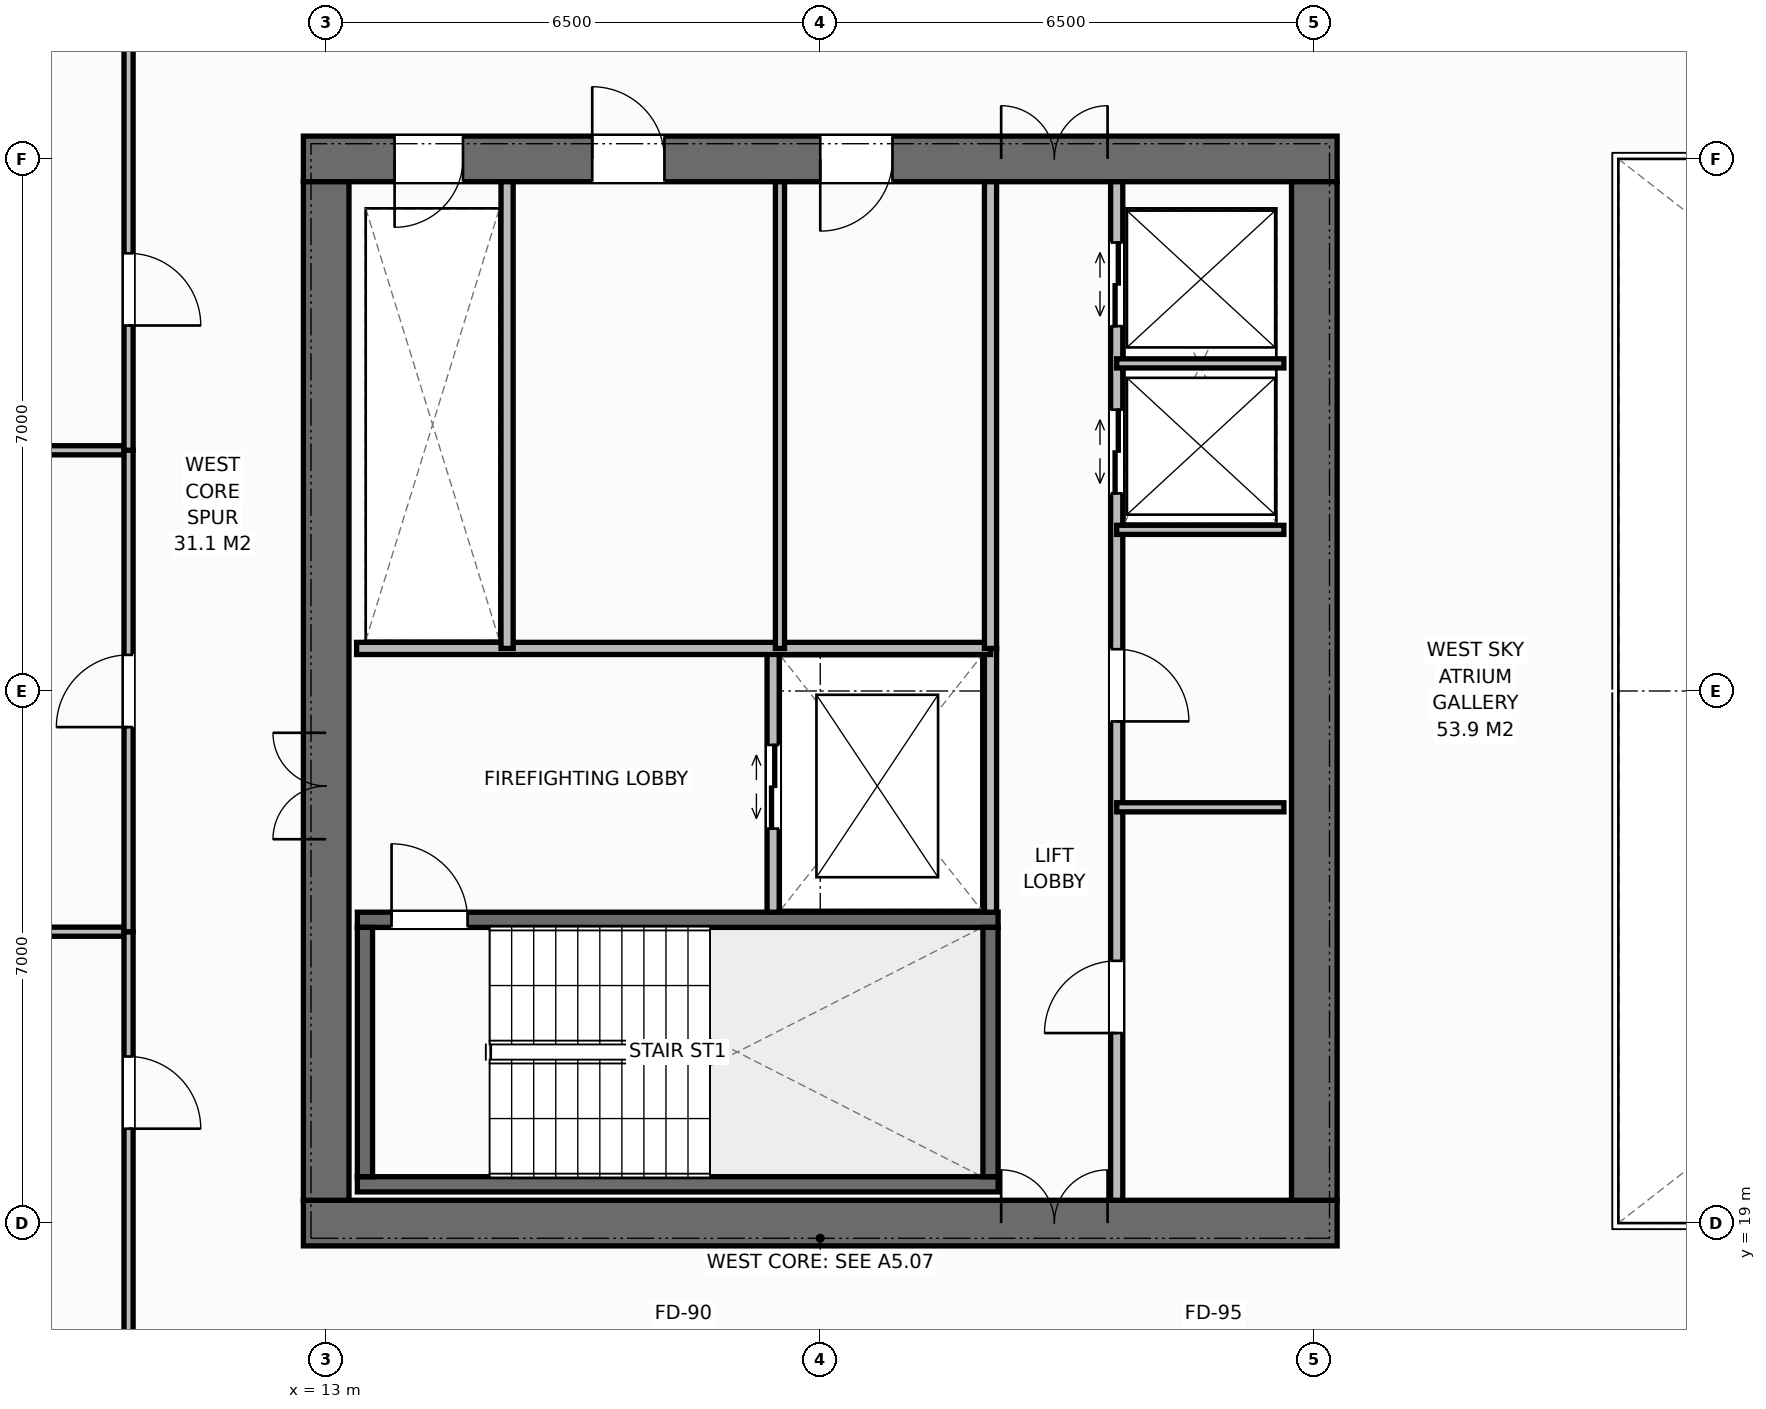
"""IFC4 building model, lengths in metres.
Left out: names, types, materials, properties, quantities, classifications, styles, units other than length and angle.
Written with IfcOpenShell. Run it as: python <this file> out.ifc"""

import sys

from ifc_helpers import new_model, si_unit, direction, frame, frame_2d, origin, place, context, subcontext, project, spatial, rectangle, extrude, element, fill, save


model = new_model("IFC4")
c1 = context("Model", 3, precision=1e-05, world=origin(), true_north=direction((0.0, 1.0)))
c2 = subcontext(c1, "Body", "Model", "MODEL_VIEW")
j1 = project(units=[si_unit("LENGTHUNIT", "METRE"), si_unit("PLANEANGLEUNIT", "RADIAN")], contexts=[c1])
p1 = place(None, origin())
s1 = spatial("IfcSite", under=j1, at=p1, CompositionType="ELEMENT")
p2 = place(p1, origin())
s2 = spatial("IfcBuilding", under=s1, at=p2, CompositionType="ELEMENT")
p3 = place(p2, frame((0.0, 0.0, 151.8)))
s3 = spatial("IfcBuildingStorey", under=s2, at=p3, CompositionType="ELEMENT", Elevation=151.8)
p4 = place(p3, frame((12.7, 19.0, 0.0), z_axis=(0.0, 0.0, 1.0), x_axis=(1.0, 0.0, 0.0)))
e1 = element("IfcWall", 1, at=p4, inside=s3, PredefinedType="SHEAR", context=c2, shape_type="SweptSolid", body=[
    extrude(rectangle(XDim=13.6, YDim=0.6, at=frame_2d((6.8, 0.0))), origin(), (0.0, 0.0, 1.0), 3.8),
])
p5 = place(p4, frame((9.18, 0.0, 0.0)))
e2 = element("IfcOpeningElement", 2, at=p5, cuts=e1, PredefinedType="OPENING", context=c2, shape_type="SweptSolid", body=[
    extrude(rectangle(XDim=1.4, YDim=2.2, at=frame_2d((0.7, 1.1))), frame((0.0, 0.31, 0.0), z_axis=(0.0, -1.0, 0.0), x_axis=(1.0, 0.0, 0.0)), (0.0, 0.0, 1.0), 0.62),
])
p6 = place(p3, frame((12.7, 33.0, 0.0), z_axis=(0.0, 0.0, 1.0), x_axis=(1.0, 0.0, 0.0)))
e3 = element("IfcWall", 3, at=p6, inside=s3, PredefinedType="SHEAR", context=c2, shape_type="SweptSolid", body=[
    extrude(rectangle(XDim=13.6, YDim=0.6, at=frame_2d((6.8, 0.0))), origin(), (0.0, 0.0, 1.0), 3.8),
])
p7 = place(p6, frame((1.2, 0.0, 0.0)))
e4 = element("IfcOpeningElement", 4, at=p7, cuts=e3, PredefinedType="OPENING", context=c2, shape_type="SweptSolid", body=[
    extrude(rectangle(XDim=0.9, YDim=2.15, at=frame_2d((0.45, 1.075))), frame((0.0, 0.31, 0.0), z_axis=(0.0, -1.0, 0.0), x_axis=(1.0, 0.0, 0.0)), (0.0, 0.0, 1.0), 0.62),
])
p8 = place(p6, frame((3.8, 0.0, 0.0)))
e5 = element("IfcOpeningElement", 5, at=p8, cuts=e3, PredefinedType="OPENING", context=c2, shape_type="SweptSolid", body=[
    extrude(rectangle(XDim=0.95, YDim=2.15, at=frame_2d((0.475, 1.075))), frame((0.0, 0.31, 0.0), z_axis=(0.0, -1.0, 0.0), x_axis=(1.0, 0.0, 0.0)), (0.0, 0.0, 1.0), 0.62),
])
p9 = place(p6, frame((6.8, 0.0, 0.0)))
e6 = element("IfcOpeningElement", 6, at=p9, cuts=e3, PredefinedType="OPENING", context=c2, shape_type="SweptSolid", body=[
    extrude(rectangle(XDim=0.95, YDim=2.15, at=frame_2d((0.475, 1.075))), frame((0.0, 0.31, 0.0), z_axis=(0.0, -1.0, 0.0), x_axis=(1.0, 0.0, 0.0)), (0.0, 0.0, 1.0), 0.62),
])
p10 = place(p6, frame((9.18, 0.0, 0.0)))
e7 = element("IfcOpeningElement", 7, at=p10, cuts=e3, PredefinedType="OPENING", context=c2, shape_type="SweptSolid", body=[
    extrude(rectangle(XDim=1.4, YDim=2.2, at=frame_2d((0.7, 1.1))), frame((0.0, 0.31, 0.0), z_axis=(0.0, -1.0, 0.0), x_axis=(1.0, 0.0, 0.0)), (0.0, 0.0, 1.0), 0.62),
])
p11 = place(p3, frame((13.0, 19.3, 0.0), z_axis=(0.0, 0.0, 1.0), x_axis=(0.0, 1.0, 0.0)))
e8 = element("IfcWall", 8, at=p11, inside=s3, PredefinedType="SHEAR", context=c2, shape_type="SweptSolid", body=[
    extrude(rectangle(XDim=13.4, YDim=0.6, at=frame_2d((6.7, 0.0))), origin(), (0.0, 0.0, 1.0), 3.8),
])
p12 = place(p11, frame((4.75, 0.0, 0.0)))
e9 = element("IfcOpeningElement", 9, at=p12, cuts=e8, PredefinedType="OPENING", context=c2, shape_type="SweptSolid", body=[
    extrude(rectangle(XDim=1.4, YDim=2.2, at=frame_2d((0.7, 1.1))), frame((0.0, 0.31, 0.0), z_axis=(0.0, -1.0, 0.0), x_axis=(1.0, 0.0, 0.0)), (0.0, 0.0, 1.0), 0.62),
])
p13 = place(p3, frame((26.0, 19.3, 0.0), z_axis=(0.0, 0.0, 1.0), x_axis=(0.0, 1.0, 0.0)))
e10 = element("IfcWall", 10, at=p13, inside=s3, PredefinedType="SHEAR", context=c2, shape_type="SweptSolid", body=[
    extrude(rectangle(XDim=13.4, YDim=0.6, at=frame_2d((6.7, 0.0))), origin(), (0.0, 0.0, 1.0), 3.8),
])
p14 = place(p3, frame((13.41, 19.51, 0.0), z_axis=(0.0, 0.0, 1.0), x_axis=(1.0, 0.0, 0.0)))
e11 = element("IfcWall", 11, at=p14, inside=s3, PredefinedType="SHEAR", context=c2, shape_type="SweptSolid", body=[
    extrude(rectangle(XDim=8.43, YDim=0.2, at=frame_2d((4.215, 0.0))), origin(), (0.0, 0.0, 1.0), 3.8),
])
p15 = place(p3, frame((13.41, 22.99, 0.0), z_axis=(0.0, 0.0, 1.0), x_axis=(1.0, 0.0, 0.0)))
e12 = element("IfcWall", 12, at=p15, inside=s3, PredefinedType="SHEAR", context=c2, shape_type="SweptSolid", body=[
    extrude(rectangle(XDim=8.43, YDim=0.2, at=frame_2d((4.215, 0.0))), origin(), (0.0, 0.0, 1.0), 3.8),
])
p16 = place(p15, frame((0.45, 0.0, 0.0)))
e13 = element("IfcOpeningElement", 13, at=p16, cuts=e12, PredefinedType="OPENING", context=c2, shape_type="SweptSolid", body=[
    extrude(rectangle(XDim=1.0, YDim=2.15, at=frame_2d((0.5, 1.075))), frame((0.0, 0.11, 0.0), z_axis=(0.0, -1.0, 0.0), x_axis=(1.0, 0.0, 0.0)), (0.0, 0.0, 1.0), 0.22),
])
for number, where, z_axis, x_axis in (
    (14, (13.51, 19.61, 0.0), (0.0, 0.0, 1.0), (0.0, 1.0, 0.0)),
    (15, (21.74, 19.61, 0.0), (0.0, 0.0, 1.0), (0.0, 1.0, 0.0)),
):
    element("IfcWall", number, at=place(p3, frame(where, z_axis=z_axis, x_axis=x_axis)), inside=s3, PredefinedType="SHEAR", context=c2, shape_type="SweptSolid", body=[
        extrude(rectangle(XDim=3.28, YDim=0.2, at=frame_2d((1.64, 0.0))), origin(), (0.0, 0.0, 1.0), 3.8),
    ])
p17 = place(p3, frame((21.74, 23.09, 0.0), z_axis=(0.0, 0.0, 1.0), x_axis=(0.0, 1.0, 0.0)))
e16 = element("IfcWall", 16, at=p17, inside=s3, PredefinedType="STANDARD", context=c2, shape_type="SweptSolid", body=[
    extrude(rectangle(XDim=3.47, YDim=0.16, at=frame_2d((1.735, 0.0))), origin(), (0.0, 0.0, 1.0), 3.572),
])
p18 = place(p3, frame((18.88, 23.09, 0.0), z_axis=(0.0, 0.0, 1.0), x_axis=(0.0, 1.0, 0.0)))
e17 = element("IfcWall", 17, at=p18, inside=s3, PredefinedType="STANDARD", context=c2, shape_type="SweptSolid", body=[
    extrude(rectangle(XDim=3.47, YDim=0.16, at=frame_2d((1.735, 0.0))), origin(), (0.0, 0.0, 1.0), 3.572),
])
p19 = place(p18, frame((1.1, 0.0, 0.0)))
e18 = element("IfcOpeningElement", 18, at=p19, cuts=e17, PredefinedType="OPENING", context=c2, shape_type="SweptSolid", body=[
    extrude(rectangle(XDim=1.1, YDim=2.2, at=frame_2d((0.55, 1.1))), frame((0.0, 0.09, 0.0), z_axis=(0.0, -1.0, 0.0), x_axis=(1.0, 0.0, 0.0)), (0.0, 0.0, 1.0), 0.18),
])
p20 = place(p3, frame((13.4, 26.56, 0.0), z_axis=(0.0, 0.0, 1.0), x_axis=(1.0, 0.0, 0.0)))
e19 = element("IfcWall", 19, at=p20, inside=s3, PredefinedType="STANDARD", context=c2, shape_type="SweptSolid", body=[
    extrude(rectangle(XDim=8.34, YDim=0.16, at=frame_2d((4.17, 0.0))), origin(), (0.0, 0.0, 1.0), 3.572),
])
p21 = place(p3, frame((15.38, 26.56, 0.0), z_axis=(0.0, 0.0, 1.0), x_axis=(0.0, 1.0, 0.0)))
e20 = element("IfcWall", 20, at=p21, inside=s3, PredefinedType="STANDARD", context=c2, shape_type="SweptSolid", body=[
    extrude(rectangle(XDim=6.14, YDim=0.16, at=frame_2d((3.07, 0.0))), origin(), (0.0, 0.0, 1.0), 3.572),
])
p22 = place(p3, frame((18.97, 26.56, 0.0), z_axis=(0.0, 0.0, 1.0), x_axis=(0.0, 1.0, 0.0)))
e21 = element("IfcWall", 21, at=p22, inside=s3, PredefinedType="PARTITIONING", context=c2, shape_type="SweptSolid", body=[
    extrude(rectangle(XDim=6.14, YDim=0.12, at=frame_2d((3.07, 0.0))), origin(), (0.0, 0.0, 1.0), 3.572),
])
p23 = place(p3, frame((21.74, 26.56, 0.0), z_axis=(0.0, 0.0, 1.0), x_axis=(0.0, 1.0, 0.0)))
e22 = element("IfcWall", 22, at=p23, inside=s3, PredefinedType="STANDARD", context=c2, shape_type="SweptSolid", body=[
    extrude(rectangle(XDim=6.14, YDim=0.16, at=frame_2d((3.07, 0.0))), origin(), (0.0, 0.0, 1.0), 3.572),
])
p24 = place(p3, frame((23.4, 19.3, 0.0), z_axis=(0.0, 0.0, 1.0), x_axis=(0.0, 1.0, 0.0)))
e23 = element("IfcWall", 23, at=p24, inside=s3, PredefinedType="STANDARD", context=c2, shape_type="SweptSolid", body=[
    extrude(rectangle(XDim=13.4, YDim=0.16, at=frame_2d((6.7, 0.0))), origin(), (0.0, 0.0, 1.0), 3.572),
])
p25 = place(p24, frame((2.2, 0.0, 0.0)))
e24 = element("IfcOpeningElement", 24, at=p25, cuts=e23, PredefinedType="OPENING", context=c2, shape_type="SweptSolid", body=[
    extrude(rectangle(XDim=0.95, YDim=2.15, at=frame_2d((0.475, 1.075))), frame((0.0, 0.09, 0.0), z_axis=(0.0, -1.0, 0.0), x_axis=(1.0, 0.0, 0.0)), (0.0, 0.0, 1.0), 0.18),
])
p26 = place(p24, frame((6.3, 0.0, 0.0)))
e25 = element("IfcOpeningElement", 25, at=p26, cuts=e23, PredefinedType="OPENING", context=c2, shape_type="SweptSolid", body=[
    extrude(rectangle(XDim=0.95, YDim=2.15, at=frame_2d((0.475, 1.075))), frame((0.0, 0.09, 0.0), z_axis=(0.0, -1.0, 0.0), x_axis=(1.0, 0.0, 0.0)), (0.0, 0.0, 1.0), 0.18),
])
p27 = place(p24, frame((9.3, 0.0, 0.0)))
e26 = element("IfcOpeningElement", 26, at=p27, cuts=e23, PredefinedType="OPENING", context=c2, shape_type="SweptSolid", body=[
    extrude(rectangle(XDim=1.1, YDim=2.2, at=frame_2d((0.55, 1.1))), frame((0.0, 0.09, 0.0), z_axis=(0.0, -1.0, 0.0), x_axis=(1.0, 0.0, 0.0)), (0.0, 0.0, 1.0), 0.18),
])
p28 = place(p24, frame((11.5, 0.0, 0.0)))
e27 = element("IfcOpeningElement", 27, at=p28, cuts=e23, PredefinedType="OPENING", context=c2, shape_type="SweptSolid", body=[
    extrude(rectangle(XDim=1.1, YDim=2.2, at=frame_2d((0.55, 1.1))), frame((0.0, 0.09, 0.0), z_axis=(0.0, -1.0, 0.0), x_axis=(1.0, 0.0, 0.0)), (0.0, 0.0, 1.0), 0.18),
])
for number, where, z_axis, x_axis in (
    (28, (23.4, 24.47, 0.0), (0.0, 0.0, 1.0), (1.0, 0.0, 0.0)),
    (29, (23.4, 28.12, 0.0), (0.0, 0.0, 1.0), (1.0, 0.0, 0.0)),
    (30, (23.4, 30.31, 0.0), (0.0, 0.0, 1.0), (1.0, 0.0, 0.0)),
):
    element("IfcWall", number, at=place(p3, frame(where, z_axis=z_axis, x_axis=x_axis)), inside=s3, PredefinedType="PARTITIONING", context=c2, shape_type="SweptSolid", body=[
        extrude(rectangle(XDim=2.2, YDim=0.12, at=frame_2d((1.1, 0.0))), origin(), (0.0, 0.0, 1.0), 3.572),
    ])
p29 = place(p3, frame((3.82, 22.833, 0.0), z_axis=(0.0, 0.0, 1.0), x_axis=(1.0, 0.0, 0.0)))
e31 = element("IfcWall", 31, at=p29, inside=s3, PredefinedType="PARTITIONING", context=c2, shape_type="SweptSolid", body=[
    extrude(rectangle(XDim=6.58, YDim=0.12, at=frame_2d((3.29, 0.0))), origin(), (0.0, 0.0, 1.0), 3.572),
])
p30 = place(p3, frame((10.4, 16.5, 0.0), z_axis=(0.0, 0.0, 1.0), x_axis=(0.0, 1.0, 0.0)))
e32 = element("IfcWall", 32, at=p30, inside=s3, PredefinedType="PARTITIONING", context=c2, shape_type="SweptSolid", body=[
    extrude(rectangle(XDim=6.333, YDim=0.12, at=frame_2d((3.167, 0.0))), origin(), (0.0, 0.0, 1.0), 3.572),
])
p31 = place(p30, frame((3.742, 0.0, 0.0)))
e33 = element("IfcOpeningElement", 33, at=p31, cuts=e32, PredefinedType="OPENING", context=c2, shape_type="SweptSolid", body=[
    extrude(rectangle(XDim=0.95, YDim=2.15, at=frame_2d((0.475, 1.075))), frame((0.0, 0.07, 0.0), z_axis=(0.0, -1.0, 0.0), x_axis=(1.0, 0.0, 0.0)), (0.0, 0.0, 1.0), 0.14),
])
p32 = place(p3, frame((3.82, 29.167, 0.0), z_axis=(0.0, 0.0, 1.0), x_axis=(1.0, 0.0, 0.0)))
e34 = element("IfcWall", 34, at=p32, inside=s3, PredefinedType="PARTITIONING", context=c2, shape_type="SweptSolid", body=[
    extrude(rectangle(XDim=6.58, YDim=0.12, at=frame_2d((3.29, 0.0))), origin(), (0.0, 0.0, 1.0), 3.572),
])
p33 = place(p3, frame((10.4, 22.833, 0.0), z_axis=(0.0, 0.0, 1.0), x_axis=(0.0, 1.0, 0.0)))
e35 = element("IfcWall", 35, at=p33, inside=s3, PredefinedType="PARTITIONING", context=c2, shape_type="SweptSolid", body=[
    extrude(rectangle(XDim=6.333, YDim=0.12, at=frame_2d((3.167, 0.0))), origin(), (0.0, 0.0, 1.0), 3.572),
])
p34 = place(p33, frame((2.692, 0.0, 0.0)))
e36 = element("IfcOpeningElement", 36, at=p34, cuts=e35, PredefinedType="OPENING", context=c2, shape_type="SweptSolid", body=[
    extrude(rectangle(XDim=0.95, YDim=2.15, at=frame_2d((0.475, 1.075))), frame((0.0, 0.07, 0.0), z_axis=(0.0, -1.0, 0.0), x_axis=(1.0, 0.0, 0.0)), (0.0, 0.0, 1.0), 0.14),
])
p35 = place(p3, frame((10.4, 29.167, 0.0), z_axis=(0.0, 0.0, 1.0), x_axis=(0.0, 1.0, 0.0)))
e37 = element("IfcWall", 37, at=p35, inside=s3, PredefinedType="PARTITIONING", context=c2, shape_type="SweptSolid", body=[
    extrude(rectangle(XDim=6.333, YDim=0.12, at=frame_2d((3.167, 0.0))), origin(), (0.0, 0.0, 1.0), 3.572),
])
p36 = place(p35, frame((1.642, 0.0, 0.0)))
e38 = element("IfcOpeningElement", 38, at=p36, cuts=e37, PredefinedType="OPENING", context=c2, shape_type="SweptSolid", body=[
    extrude(rectangle(XDim=0.95, YDim=2.15, at=frame_2d((0.475, 1.075))), frame((0.0, 0.07, 0.0), z_axis=(0.0, -1.0, 0.0), x_axis=(1.0, 0.0, 0.0)), (0.0, 0.0, 1.0), 0.14),
])
p37 = place(p16, origin())
e39 = element("IfcDoor", 39, at=p37, inside=s3, OperationType="SINGLE_SWING_LEFT", PredefinedType="DOOR", context=c2, shape_type="SweptSolid", body=[
    extrude(rectangle(XDim=1.0, YDim=2.15, at=frame_2d((0.5, 1.075))), frame((0.0, 0.025, 0.0), z_axis=(0.0, -1.0, 0.0), x_axis=(1.0, 0.0, 0.0)), (0.0, 0.0, 1.0), 0.05),
])
fill(e13, e39)
p38 = place(p12, origin())
e40 = element("IfcDoor", 40, at=p38, inside=s3, OperationType="DOUBLE_DOOR_SINGLE_SWING", PredefinedType="DOOR", context=c2, shape_type="SweptSolid", body=[
    extrude(rectangle(XDim=1.4, YDim=2.2, at=frame_2d((0.7, 1.1))), frame((0.0, 0.025, 0.0), z_axis=(0.0, -1.0, 0.0), x_axis=(1.0, 0.0, 0.0)), (0.0, 0.0, 1.0), 0.05),
])
fill(e9, e40)
p39 = place(p19, origin())
e41 = element("IfcDoor", 41, at=p39, inside=s3, OperationType="DOUBLE_DOOR_SLIDING", PredefinedType="DOOR", context=c2, shape_type="SweptSolid", body=[
    extrude(rectangle(XDim=1.1, YDim=2.2, at=frame_2d((0.55, 1.1))), frame((0.0, 0.025, 0.0), z_axis=(0.0, -1.0, 0.0), x_axis=(1.0, 0.0, 0.0)), (0.0, 0.0, 1.0), 0.05),
])
fill(e18, e41)
p40 = place(p7, origin())
e42 = element("IfcDoor", 42, at=p40, inside=s3, OperationType="SINGLE_SWING_RIGHT", PredefinedType="DOOR", context=c2, shape_type="SweptSolid", body=[
    extrude(rectangle(XDim=0.9, YDim=2.15, at=frame_2d((0.45, 1.075))), frame((0.0, -0.025, 0.0), z_axis=(0.0, -1.0, 0.0), x_axis=(1.0, 0.0, 0.0)), (0.0, 0.0, 1.0), 0.05),
])
fill(e4, e42)
p41 = place(p8, origin())
e43 = element("IfcDoor", 43, at=p41, inside=s3, OperationType="SINGLE_SWING_LEFT", PredefinedType="DOOR", context=c2, shape_type="SweptSolid", body=[
    extrude(rectangle(XDim=0.95, YDim=2.15, at=frame_2d((0.475, 1.075))), frame((0.0, -0.025, 0.0), z_axis=(0.0, -1.0, 0.0), x_axis=(1.0, 0.0, 0.0)), (0.0, 0.0, 1.0), 0.05),
])
fill(e5, e43)
p42 = place(p9, origin())
e44 = element("IfcDoor", 44, at=p42, inside=s3, OperationType="SINGLE_SWING_RIGHT", PredefinedType="DOOR", context=c2, shape_type="SweptSolid", body=[
    extrude(rectangle(XDim=0.95, YDim=2.15, at=frame_2d((0.475, 1.075))), frame((0.0, -0.025, 0.0), z_axis=(0.0, -1.0, 0.0), x_axis=(1.0, 0.0, 0.0)), (0.0, 0.0, 1.0), 0.05),
])
fill(e6, e44)
p43 = place(p5, origin())
e45 = element("IfcDoor", 45, at=p43, inside=s3, OperationType="DOUBLE_DOOR_SINGLE_SWING", PredefinedType="DOOR", context=c2, shape_type="SweptSolid", body=[
    extrude(rectangle(XDim=1.4, YDim=2.2, at=frame_2d((0.7, 1.1))), frame((0.0, 0.075, 0.0), z_axis=(0.0, -1.0, 0.0), x_axis=(1.0, 0.0, 0.0)), (0.0, 0.0, 1.0), 0.05),
])
fill(e2, e45)
p44 = place(p10, origin())
e46 = element("IfcDoor", 46, at=p44, inside=s3, OperationType="DOUBLE_DOOR_SINGLE_SWING", PredefinedType="DOOR", context=c2, shape_type="SweptSolid", body=[
    extrude(rectangle(XDim=1.4, YDim=2.2, at=frame_2d((0.7, 1.1))), frame((0.0, -0.025, 0.0), z_axis=(0.0, -1.0, 0.0), x_axis=(1.0, 0.0, 0.0)), (0.0, 0.0, 1.0), 0.05),
])
fill(e7, e46)
p45 = place(p25, origin())
e47 = element("IfcDoor", 47, at=p45, inside=s3, OperationType="SINGLE_SWING_LEFT", PredefinedType="DOOR", context=c2, shape_type="SweptSolid", body=[
    extrude(rectangle(XDim=0.95, YDim=2.15, at=frame_2d((0.475, 1.075))), frame((0.0, 0.025, 0.0), z_axis=(0.0, -1.0, 0.0), x_axis=(1.0, 0.0, 0.0)), (0.0, 0.0, 1.0), 0.05),
])
fill(e24, e47)
p46 = place(p26, origin())
e48 = element("IfcDoor", 48, at=p46, inside=s3, OperationType="SINGLE_SWING_RIGHT", PredefinedType="DOOR", context=c2, shape_type="SweptSolid", body=[
    extrude(rectangle(XDim=0.95, YDim=2.15, at=frame_2d((0.475, 1.075))), frame((0.0, 0.025, 0.0), z_axis=(0.0, -1.0, 0.0), x_axis=(1.0, 0.0, 0.0)), (0.0, 0.0, 1.0), 0.05),
])
fill(e25, e48)
p47 = place(p27, origin())
e49 = element("IfcDoor", 49, at=p47, inside=s3, OperationType="DOUBLE_DOOR_SLIDING", PredefinedType="DOOR", context=c2, shape_type="SweptSolid", body=[
    extrude(rectangle(XDim=1.1, YDim=2.2, at=frame_2d((0.55, 1.1))), frame((0.0, 0.025, 0.0), z_axis=(0.0, -1.0, 0.0), x_axis=(1.0, 0.0, 0.0)), (0.0, 0.0, 1.0), 0.05),
])
fill(e26, e49)
p48 = place(p28, origin())
e50 = element("IfcDoor", 50, at=p48, inside=s3, OperationType="DOUBLE_DOOR_SLIDING", PredefinedType="DOOR", context=c2, shape_type="SweptSolid", body=[
    extrude(rectangle(XDim=1.1, YDim=2.2, at=frame_2d((0.55, 1.1))), frame((0.0, 0.025, 0.0), z_axis=(0.0, -1.0, 0.0), x_axis=(1.0, 0.0, 0.0)), (0.0, 0.0, 1.0), 0.05),
])
fill(e27, e50)
p49 = place(p31, origin())
e51 = element("IfcDoor", 51, at=p49, inside=s3, OperationType="SINGLE_SWING_RIGHT", PredefinedType="DOOR", context=c2, shape_type="SweptSolid", body=[
    extrude(rectangle(XDim=0.95, YDim=2.15, at=frame_2d((0.475, 1.075))), frame((0.0, 0.025, 0.0), z_axis=(0.0, -1.0, 0.0), x_axis=(1.0, 0.0, 0.0)), (0.0, 0.0, 1.0), 0.05),
])
fill(e33, e51)
p50 = place(p34, origin())
e52 = element("IfcDoor", 52, at=p50, inside=s3, OperationType="SINGLE_SWING_LEFT", PredefinedType="DOOR", context=c2, shape_type="SweptSolid", body=[
    extrude(rectangle(XDim=0.95, YDim=2.15, at=frame_2d((0.475, 1.075))), frame((0.0, 0.025, 0.0), z_axis=(0.0, -1.0, 0.0), x_axis=(1.0, 0.0, 0.0)), (0.0, 0.0, 1.0), 0.05),
])
fill(e36, e52)
p51 = place(p36, origin())
e53 = element("IfcDoor", 53, at=p51, inside=s3, OperationType="SINGLE_SWING_RIGHT", PredefinedType="DOOR", context=c2, shape_type="SweptSolid", body=[
    extrude(rectangle(XDim=0.95, YDim=2.15, at=frame_2d((0.475, 1.075))), frame((0.0, 0.025, 0.0), z_axis=(0.0, -1.0, 0.0), x_axis=(1.0, 0.0, 0.0)), (0.0, 0.0, 1.0), 0.05),
])
fill(e38, e53)
save(model, sys.argv[1])
